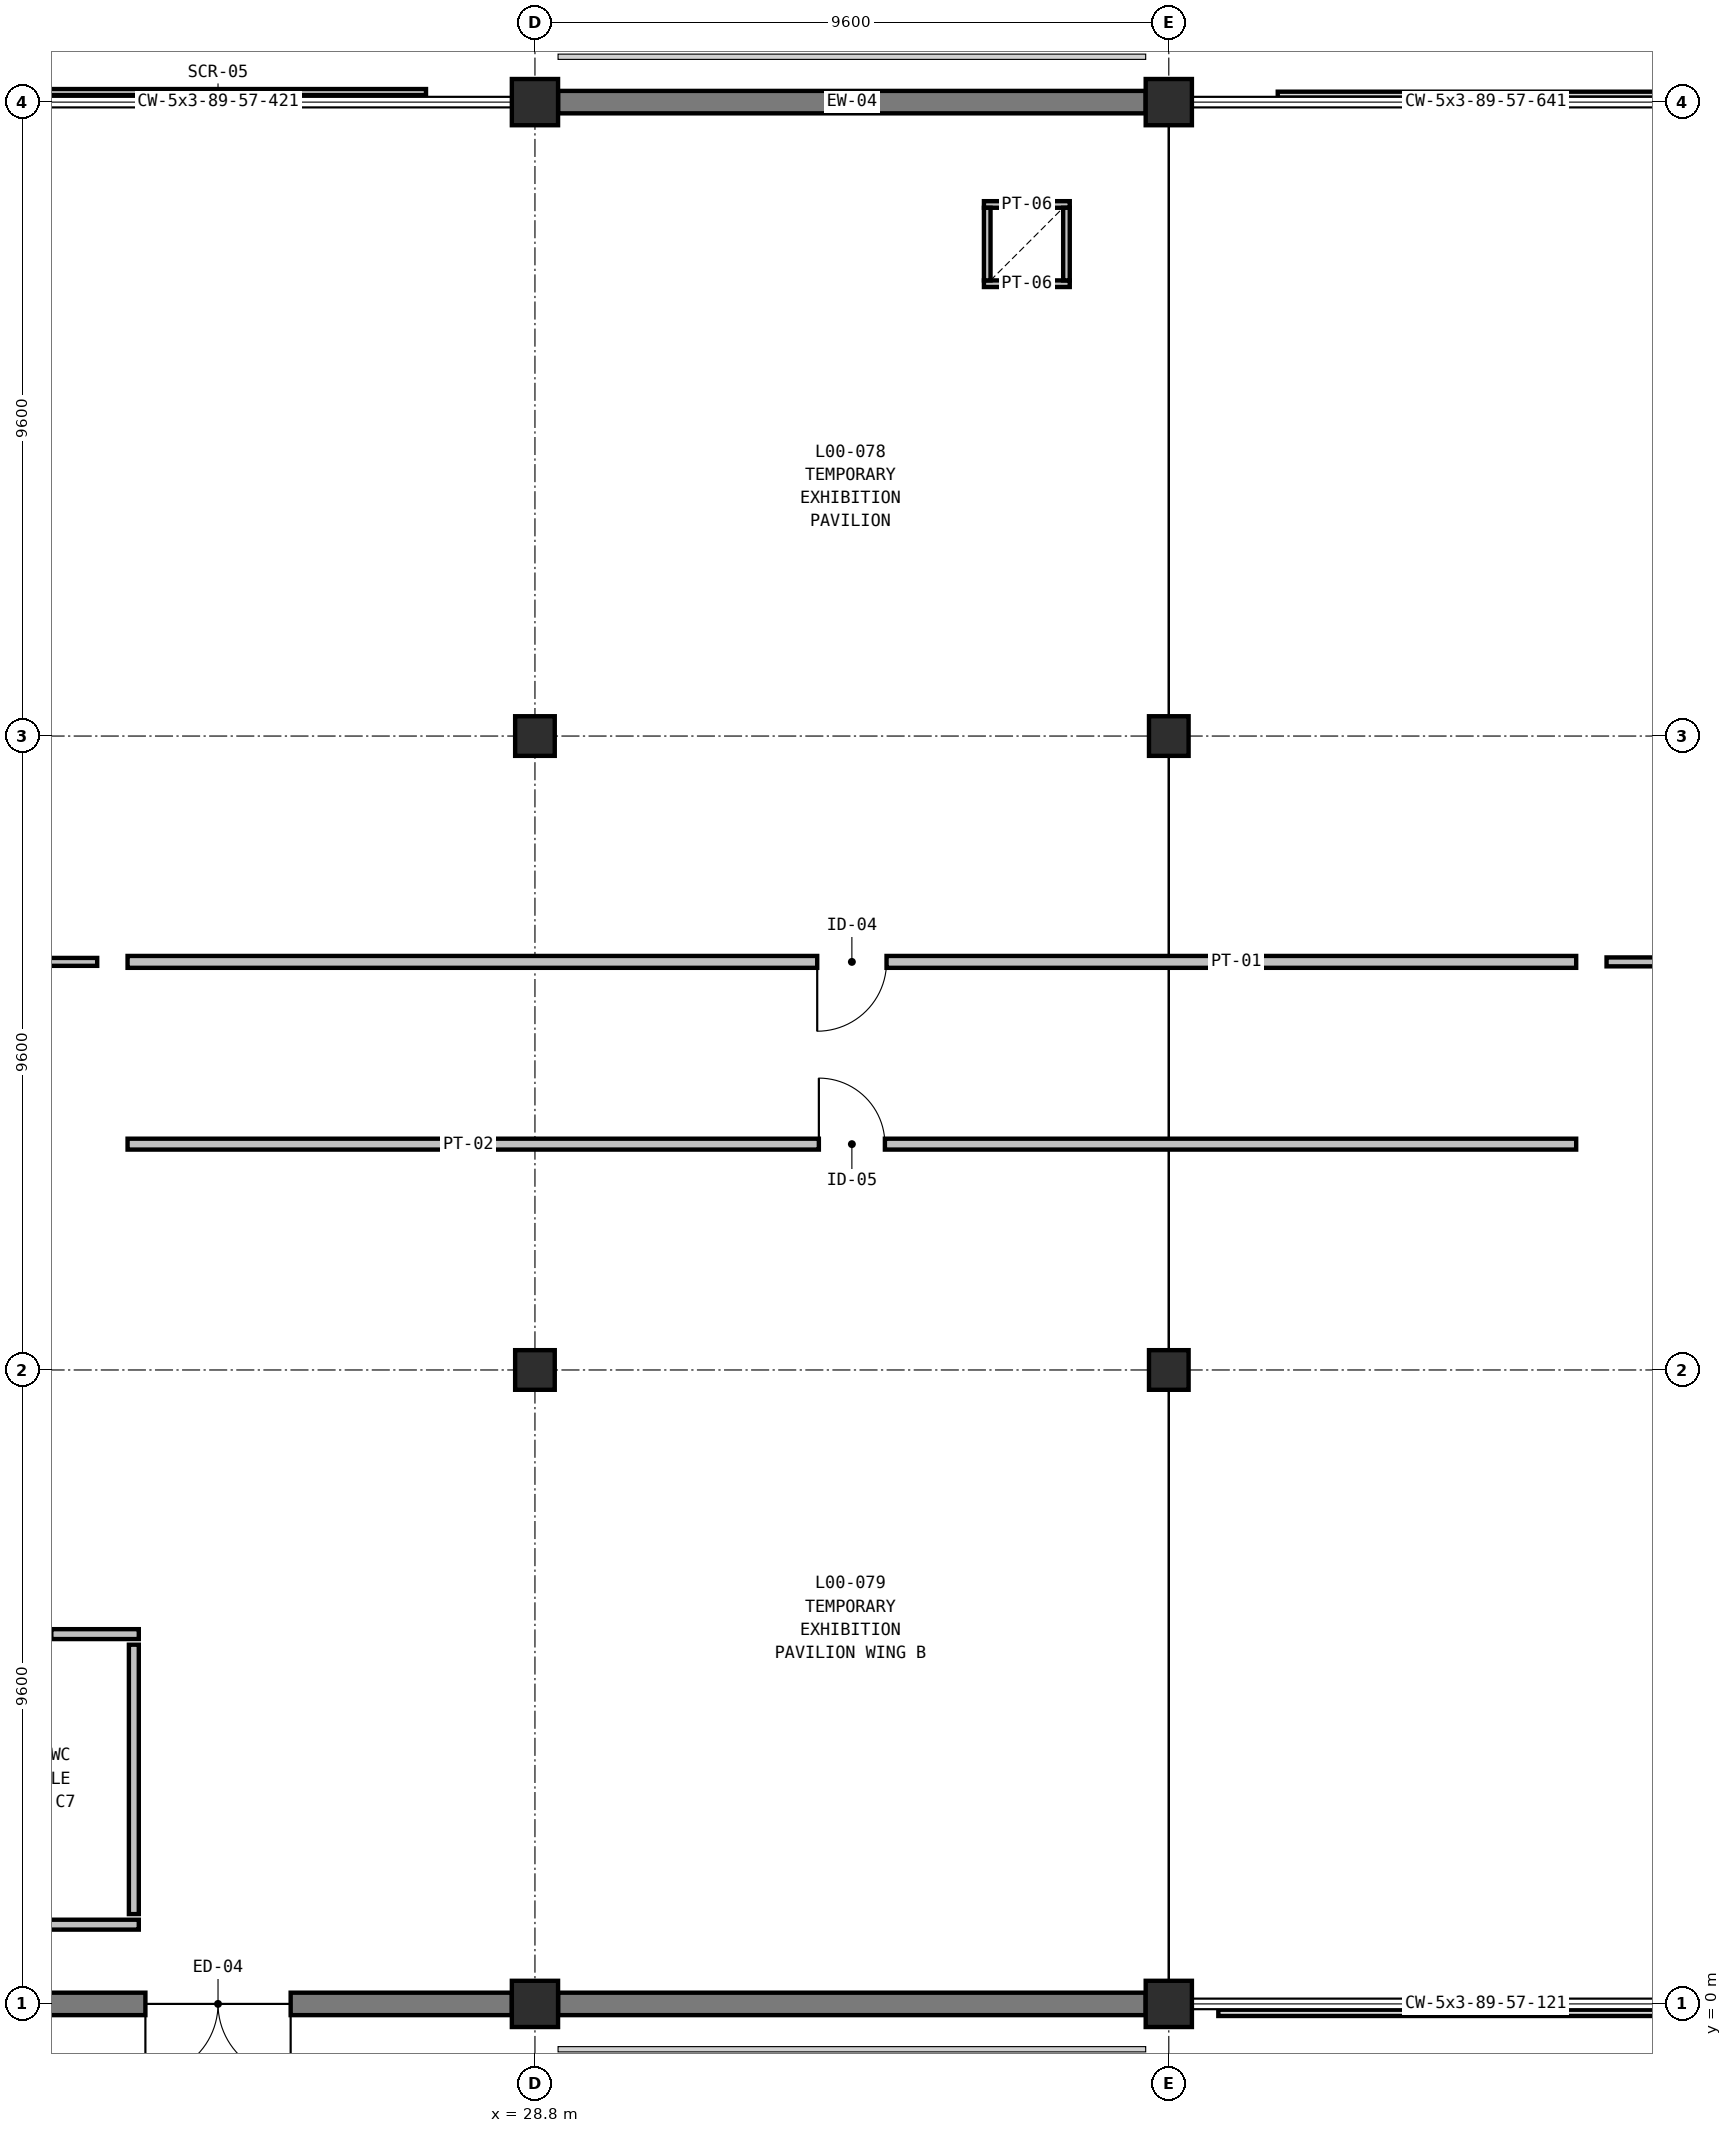
"""IFC4 building model, lengths in metres.
Left out: names, types, materials, properties, quantities, classifications, styles, units other than length and angle.
Written with IfcOpenShell. Run it as: python <this file> out.ifc"""

import sys

from ifc_helpers import new_model, si_unit, direction, frame, frame_2d, origin, origin_2d, place, context, subcontext, project, spatial, rectangle, extrude, element, fill, save


model = new_model("IFC4")
c1 = context("Model", 3, precision=1e-05, world=origin(), true_north=direction((0.0, 1.0)))
c2 = subcontext(c1, "Body", "Model", "MODEL_VIEW")
j1 = project(units=[si_unit("LENGTHUNIT", "METRE"), si_unit("PLANEANGLEUNIT", "RADIAN")], contexts=[c1])
p1 = place(None, origin())
s1 = spatial("IfcSite", under=j1, at=p1, CompositionType="ELEMENT")
p2 = place(p1, origin())
s2 = spatial("IfcBuilding", under=s1, at=p2, CompositionType="ELEMENT")
p3 = place(p2, origin())
s3 = spatial("IfcBuildingStorey", under=s2, at=p3, CompositionType="ELEMENT", Elevation=0.0)
p4 = place(p3, frame((28.8, 0.0, 0.0), z_axis=(0.0, 0.0, 1.0), x_axis=(1.0, 0.0, 0.0)))
e1 = element("IfcColumn", 1, at=p4, inside=s3, PredefinedType="COLUMN", context=c2, shape_type="SweptSolid", body=[
    extrude(rectangle(XDim=0.7, YDim=0.7, at=origin_2d()), origin(), (0.0, 0.0, 1.0), 6.0),
])
for number, where, z_axis, x_axis in (
    (2, (28.8, 9.6, 0.0), (0.0, 0.0, 1.0), (1.0, 0.0, 0.0)),
    (3, (28.8, 19.2, 0.0), (0.0, 0.0, 1.0), (1.0, 0.0, 0.0)),
):
    element("IfcColumn", number, at=place(p3, frame(where, z_axis=z_axis, x_axis=x_axis)), inside=s3, PredefinedType="COLUMN", context=c2, shape_type="SweptSolid", body=[
        extrude(rectangle(XDim=0.6, YDim=0.6, at=origin_2d()), origin(), (0.0, 0.0, 1.0), 6.0),
    ])
for number, where, z_axis, x_axis in (
    (4, (28.8, 28.8, 0.0), (0.0, 0.0, 1.0), (1.0, 0.0, 0.0)),
    (5, (38.4, 0.0, 0.0), (0.0, 0.0, 1.0), (1.0, 0.0, 0.0)),
):
    element("IfcColumn", number, at=place(p3, frame(where, z_axis=z_axis, x_axis=x_axis)), inside=s3, PredefinedType="COLUMN", context=c2, shape_type="SweptSolid", body=[
        extrude(rectangle(XDim=0.7, YDim=0.7, at=origin_2d()), origin(), (0.0, 0.0, 1.0), 6.0),
    ])
for number, where, z_axis, x_axis in (
    (6, (38.4, 9.6, 0.0), (0.0, 0.0, 1.0), (1.0, 0.0, 0.0)),
    (7, (38.4, 19.2, 0.0), (0.0, 0.0, 1.0), (1.0, 0.0, 0.0)),
):
    element("IfcColumn", number, at=place(p3, frame(where, z_axis=z_axis, x_axis=x_axis)), inside=s3, PredefinedType="COLUMN", context=c2, shape_type="SweptSolid", body=[
        extrude(rectangle(XDim=0.6, YDim=0.6, at=origin_2d()), origin(), (0.0, 0.0, 1.0), 6.0),
    ])
p5 = place(p3, frame((38.4, 28.8, 0.0), z_axis=(0.0, 0.0, 1.0), x_axis=(1.0, 0.0, 0.0)))
e8 = element("IfcColumn", 8, at=p5, inside=s3, PredefinedType="COLUMN", context=c2, shape_type="SweptSolid", body=[
    extrude(rectangle(XDim=0.7, YDim=0.7, at=origin_2d()), origin(), (0.0, 0.0, 1.0), 6.0),
])
for number, where, z_axis, x_axis in (
    (9, (29.15, 28.8, 0.0), (0.0, 0.0, 1.0), (1.0, 0.0, 0.0)),
    (10, (38.05, 0.0, 0.0), (0.0, 0.0, 1.0), (-1.0, 0.0, 0.0)),
):
    element("IfcWall", number, at=place(p3, frame(where, z_axis=z_axis, x_axis=x_axis)), inside=s3, PredefinedType="SOLIDWALL", context=c2, shape_type="SweptSolid", body=[
        extrude(rectangle(XDim=8.9, YDim=0.34, at=frame_2d((4.45, 0.0))), origin(), (0.0, 0.0, 1.0), 5.68),
    ])
p6 = place(p3, frame((28.45, 0.0, 0.0), z_axis=(0.0, 0.0, 1.0), x_axis=(-1.0, 0.0, 0.0)))
e11 = element("IfcWall", 11, at=p6, inside=s3, PredefinedType="SOLIDWALL", context=c2, shape_type="SweptSolid", body=[
    extrude(rectangle(XDim=8.9, YDim=0.34, at=frame_2d((4.45, 0.0))), origin(), (0.0, 0.0, 1.0), 5.68),
])
p7 = place(p6, frame((3.35, 0.0, 0.0)))
e12 = element("IfcOpeningElement", 12, at=p7, cuts=e11, PredefinedType="OPENING", context=c2, shape_type="SweptSolid", body=[
    extrude(rectangle(XDim=2.2, YDim=2.4, at=frame_2d((1.1, 1.2))), frame((0.0, 0.18, 0.0), z_axis=(0.0, -1.0, 0.0), x_axis=(1.0, 0.0, 0.0)), (0.0, 0.0, 1.0), 0.36),
])
p8 = place(p3, frame((15.6, 5.6, 0.0), z_axis=(0.0, 0.0, 1.0), x_axis=(1.0, 0.0, 0.0)))
e13 = element("IfcWall", 13, at=p8, inside=s3, PredefinedType="PARTITIONING", context=c2, shape_type="SweptSolid", body=[
    extrude(rectangle(XDim=7.2, YDim=0.15, at=frame_2d((3.6, 0.0))), origin(), (0.0, 0.0, 1.0), 4.855),
])
p9 = place(p8, frame((1.35, 0.0, 0.0)))
e14 = element("IfcOpeningElement", 14, at=p9, cuts=e13, PredefinedType="OPENING", context=c2, shape_type="SweptSolid", body=[
    extrude(rectangle(XDim=0.9, YDim=2.1, at=frame_2d((0.45, 1.05))), frame((0.0, 0.085, 0.0), z_axis=(0.0, -1.0, 0.0), x_axis=(1.0, 0.0, 0.0)), (0.0, 0.0, 1.0), 0.17),
])
p10 = place(p8, frame((4.925, 0.0, 0.0)))
e15 = element("IfcOpeningElement", 15, at=p10, cuts=e13, PredefinedType="OPENING", context=c2, shape_type="SweptSolid", body=[
    extrude(rectangle(XDim=0.95, YDim=2.15, at=frame_2d((0.475, 1.075))), frame((0.0, 0.085, 0.0), z_axis=(0.0, -1.0, 0.0), x_axis=(1.0, 0.0, 0.0)), (0.0, 0.0, 1.0), 0.17),
])
p11 = place(p3, frame((15.6, 1.2, 0.0), z_axis=(0.0, 0.0, 1.0), x_axis=(1.0, 0.0, 0.0)))
e16 = element("IfcWall", 16, at=p11, inside=s3, PredefinedType="PARTITIONING", context=c2, shape_type="SweptSolid", body=[
    extrude(rectangle(XDim=7.2, YDim=0.15, at=frame_2d((3.6, 0.0))), origin(), (0.0, 0.0, 1.0), 4.855),
])
p12 = place(p3, frame((22.725, 1.36, 0.0), z_axis=(0.0, 0.0, 1.0), x_axis=(0.0, 1.0, 0.0)))
e17 = element("IfcWall", 17, at=p12, inside=s3, PredefinedType="PARTITIONING", context=c2, shape_type="SweptSolid", body=[
    extrude(rectangle(XDim=4.08, YDim=0.15, at=frame_2d((2.04, 0.0))), origin(), (0.0, 0.0, 1.0), 5.055),
])
for number, where, z_axis, x_axis in (
    (18, (35.6, 27.25, 0.0), (0.0, 0.0, 1.0), (1.0, 0.0, 0.0)),
    (19, (36.9, 26.05, 0.0), (0.0, 0.0, 1.0), (-1.0, 0.0, 0.0)),
):
    element("IfcWall", number, at=place(p3, frame(where, z_axis=z_axis, x_axis=x_axis)), inside=s3, PredefinedType="PARTITIONING", context=c2, shape_type="SweptSolid", body=[
        extrude(rectangle(XDim=1.3, YDim=0.1, at=frame_2d((0.65, 0.0))), origin(), (0.0, 0.0, 1.0), 5.68),
    ])
for number, where, z_axis, x_axis in (
    (20, (35.65, 26.1, 0.0), (0.0, 0.0, 1.0), (0.0, 1.0, 0.0)),
    (21, (36.85, 27.2, 0.0), (0.0, 0.0, 1.0), (0.0, -1.0, 0.0)),
):
    element("IfcWall", number, at=place(p3, frame(where, z_axis=z_axis, x_axis=x_axis)), inside=s3, PredefinedType="PARTITIONING", context=c2, shape_type="SweptSolid", body=[
        extrude(rectangle(XDim=1.1, YDim=0.1, at=frame_2d((0.55, 0.0))), origin(), (0.0, 0.0, 1.0), 5.68),
    ])
p13 = place(p3, frame((22.17, 15.78, 0.0), z_axis=(0.0, 0.0, 1.0), x_axis=(-1.0, 0.0, 0.0)))
e22 = element("IfcWall", 22, at=p13, inside=s3, PredefinedType="PARTITIONING", context=c2, shape_type="SweptSolid", body=[
    extrude(rectangle(XDim=21.62, YDim=0.12, at=frame_2d((10.81, 0.0))), origin(), (0.0, 0.0, 1.0), 4.855),
])
p14 = place(p13, frame((10.11, 0.0, 0.0)))
e23 = element("IfcOpeningElement", 23, at=p14, cuts=e22, PredefinedType="OPENING", context=c2, shape_type="SweptSolid", body=[
    extrude(rectangle(XDim=1.4, YDim=2.3, at=frame_2d((0.7, 1.15))), frame((0.0, 0.07, 0.0), z_axis=(0.0, -1.0, 0.0), x_axis=(1.0, 0.0, 0.0)), (0.0, 0.0, 1.0), 0.14),
])
p15 = place(p3, frame((44.57, 15.78, 0.0), z_axis=(0.0, 0.0, 1.0), x_axis=(-1.0, 0.0, 0.0)))
e24 = element("IfcWall", 24, at=p15, inside=s3, PredefinedType="PARTITIONING", context=c2, shape_type="SweptSolid", body=[
    extrude(rectangle(XDim=21.94, YDim=0.18, at=frame_2d((10.97, 0.0))), origin(), (0.0, 0.0, 1.0), 4.855),
])
p16 = place(p15, frame((10.445, 0.0, 0.0)))
e25 = element("IfcOpeningElement", 25, at=p16, cuts=e24, PredefinedType="OPENING", context=c2, shape_type="SweptSolid", body=[
    extrude(rectangle(XDim=1.05, YDim=2.2, at=frame_2d((0.525, 1.1))), frame((0.0, 0.1, 0.0), z_axis=(0.0, -1.0, 0.0), x_axis=(1.0, 0.0, 0.0)), (0.0, 0.0, 1.0), 0.2),
])
p17 = place(p3, frame((22.63, 13.02, 0.0), z_axis=(0.0, 0.0, 1.0), x_axis=(1.0, 0.0, 0.0)))
e26 = element("IfcWall", 26, at=p17, inside=s3, PredefinedType="PARTITIONING", context=c2, shape_type="SweptSolid", body=[
    extrude(rectangle(XDim=21.94, YDim=0.165, at=frame_2d((10.97, 0.0))), origin(), (0.0, 0.0, 1.0), 4.855),
])
p18 = place(p17, frame((10.47, 0.0, 0.0)))
e27 = element("IfcOpeningElement", 27, at=p18, cuts=e26, PredefinedType="OPENING", context=c2, shape_type="SweptSolid", body=[
    extrude(rectangle(XDim=1.0, YDim=2.15, at=frame_2d((0.5, 1.075))), frame((0.0, 0.093, 0.0), z_axis=(0.0, -1.0, 0.0), x_axis=(1.0, 0.0, 0.0)), (0.0, 0.0, 1.0), 0.185),
])
p19 = place(p3, frame((66.65, 15.78, 0.0), z_axis=(0.0, 0.0, 1.0), x_axis=(-1.0, 0.0, 0.0)))
e28 = element("IfcWall", 28, at=p19, inside=s3, PredefinedType="PARTITIONING", context=c2, shape_type="SweptSolid", body=[
    extrude(rectangle(XDim=21.62, YDim=0.135, at=frame_2d((10.81, 0.0))), origin(), (0.0, 0.0, 1.0), 4.855),
])
p20 = place(p19, frame((9.61, 0.0, 0.0)))
e29 = element("IfcOpeningElement", 29, at=p20, cuts=e28, PredefinedType="OPENING", context=c2, shape_type="SweptSolid", body=[
    extrude(rectangle(XDim=2.4, YDim=2.6, at=frame_2d((1.2, 1.3))), frame((0.0, 0.077, 0.0), z_axis=(0.0, -1.0, 0.0), x_axis=(1.0, 0.0, 0.0)), (0.0, 0.0, 1.0), 0.155),
])
p21 = place(p7, origin())
e30 = element("IfcDoor", 30, at=p21, inside=s3, OperationType="DOUBLE_DOOR_SINGLE_SWING", PredefinedType="DOOR", context=c2, shape_type="SweptSolid", body=[
    extrude(rectangle(XDim=2.2, YDim=2.4, at=frame_2d((1.1, 1.2))), frame((0.0, 0.025, 0.0), z_axis=(0.0, -1.0, 0.0), x_axis=(1.0, 0.0, 0.0)), (0.0, 0.0, 1.0), 0.05),
])
fill(e12, e30)
p22 = place(p16, origin())
e31 = element("IfcDoor", 31, at=p22, inside=s3, OperationType="SINGLE_SWING_RIGHT", PredefinedType="DOOR", context=c2, shape_type="SweptSolid", body=[
    extrude(rectangle(XDim=1.05, YDim=2.2, at=frame_2d((0.525, 1.1))), frame((0.0, 0.025, 0.0), z_axis=(0.0, -1.0, 0.0), x_axis=(1.0, 0.0, 0.0)), (0.0, 0.0, 1.0), 0.05),
])
fill(e25, e31)
p23 = place(p18, origin())
e32 = element("IfcDoor", 32, at=p23, inside=s3, OperationType="SINGLE_SWING_LEFT", PredefinedType="DOOR", context=c2, shape_type="SweptSolid", body=[
    extrude(rectangle(XDim=1.0, YDim=2.15, at=frame_2d((0.5, 1.075))), frame((0.0, 0.025, 0.0), z_axis=(0.0, -1.0, 0.0), x_axis=(1.0, 0.0, 0.0)), (0.0, 0.0, 1.0), 0.05),
])
fill(e27, e32)
save(model, sys.argv[1])
